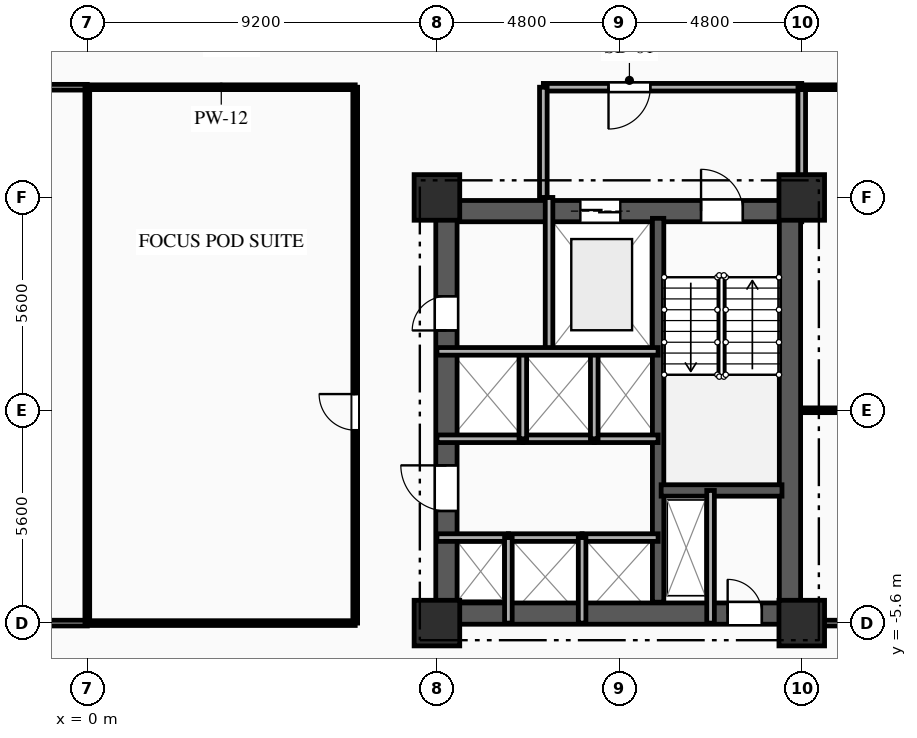
"""IFC4 building model, lengths in metres.
Left out: names, types, materials, properties, quantities, classifications, styles, units other than length and angle.
Written with IfcOpenShell. Run it as: python <this file> out.ifc"""

import sys

from ifc_helpers import new_model, si_unit, direction, frame, frame_2d, origin, origin_2d, place, context, subcontext, project, spatial, rectangle, extrude, element, fill, save


model = new_model("IFC4")
c1 = context("Model", 3, precision=1e-05, world=origin(), true_north=direction((0.0, 1.0)))
c2 = subcontext(c1, "Body", "Model", "MODEL_VIEW")
j1 = project(units=[si_unit("LENGTHUNIT", "METRE"), si_unit("PLANEANGLEUNIT", "RADIAN")], contexts=[c1])
p1 = place(None, origin())
s1 = spatial("IfcSite", under=j1, at=p1, CompositionType="ELEMENT")
p2 = place(p1, origin())
s2 = spatial("IfcBuilding", under=s1, at=p2, CompositionType="ELEMENT")
p3 = place(p2, frame((0.0, 0.0, 63.85)))
s3 = spatial("IfcBuildingStorey", under=s2, at=p3, CompositionType="ELEMENT", Elevation=63.85)
for number, where, z_axis, x_axis in (
    (1, (9.2, -5.6, 0.0), (0.0, 0.0, 1.0), (1.0, 0.0, 0.0)),
    (2, (9.2, 5.6, 0.0), (0.0, 0.0, 1.0), (1.0, 0.0, 0.0)),
    (3, (18.8, -5.6, 0.0), (0.0, 0.0, 1.0), (1.0, 0.0, 0.0)),
    (4, (18.8, 5.6, 0.0), (0.0, 0.0, 1.0), (1.0, 0.0, 0.0)),
):
    element("IfcColumn", number, at=place(p3, frame(where, z_axis=z_axis, x_axis=x_axis)), inside=s3, PredefinedType="COLUMN", context=c2, shape_type="SweptSolid", body=[
        extrude(rectangle(XDim=1.2, YDim=1.2, at=origin_2d()), origin(), (0.0, 0.0, 1.0), 3.35),
    ])
p4 = place(p3, frame((9.2, 5.24, 0.0), z_axis=(0.0, 0.0, 1.0), x_axis=(1.0, 0.0, 0.0)))
e5 = element("IfcWall", 5, at=p4, inside=s3, PredefinedType="SHEAR", context=c2, shape_type="SweptSolid", body=[
    extrude(rectangle(XDim=9.6, YDim=0.56, at=frame_2d((4.8, 0.0))), origin(), (0.0, 0.0, 1.0), 3.035),
])
p5 = place(p4, frame((6.95, 0.0, 0.0)))
e6 = element("IfcOpeningElement", 6, at=p5, cuts=e5, PredefinedType="OPENING", context=c2, shape_type="SweptSolid", body=[
    extrude(rectangle(XDim=1.1, YDim=2.15, at=frame_2d((0.55, 1.075))), frame((0.0, 0.29, 0.0), z_axis=(0.0, -1.0, 0.0), x_axis=(1.0, 0.0, 0.0)), (0.0, 0.0, 1.0), 0.58),
])
p6 = place(p4, frame((3.775, 0.0, 0.0)))
e7 = element("IfcOpeningElement", 7, at=p6, cuts=e5, PredefinedType="OPENING", context=c2, shape_type="SweptSolid", body=[
    extrude(rectangle(XDim=1.05, YDim=2.1, at=frame_2d((0.525, 1.05))), frame((0.0, 0.29, 0.0), z_axis=(0.0, -1.0, 0.0), x_axis=(1.0, 0.0, 0.0)), (0.0, 0.0, 1.0), 0.58),
])
p7 = place(p3, frame((9.2, -5.35, 0.0), z_axis=(0.0, 0.0, 1.0), x_axis=(1.0, 0.0, 0.0)))
e8 = element("IfcWall", 8, at=p7, inside=s3, PredefinedType="SHEAR", context=c2, shape_type="SweptSolid", body=[
    extrude(rectangle(XDim=9.6, YDim=0.56, at=frame_2d((4.8, 0.0))), origin(), (0.0, 0.0, 1.0), 3.035),
])
p8 = place(p7, frame((7.65, 0.0, 0.0)))
e9 = element("IfcOpeningElement", 9, at=p8, cuts=e8, PredefinedType="OPENING", context=c2, shape_type="SweptSolid", body=[
    extrude(rectangle(XDim=0.9, YDim=2.1, at=frame_2d((0.45, 1.05))), frame((0.0, 0.29, 0.0), z_axis=(0.0, -1.0, 0.0), x_axis=(1.0, 0.0, 0.0)), (0.0, 0.0, 1.0), 0.58),
])
p9 = place(p3, frame((9.45, -5.05, 0.0), z_axis=(0.0, 0.0, 1.0), x_axis=(0.0, 1.0, 0.0)))
e10 = element("IfcWall", 10, at=p9, inside=s3, PredefinedType="SHEAR", context=c2, shape_type="SweptSolid", body=[
    extrude(rectangle(XDim=10.1, YDim=0.56, at=frame_2d((5.05, 0.0))), origin(), (0.0, 0.0, 1.0), 3.035),
])
p10 = place(p9, frame((7.15, 0.0, 0.0)))
e11 = element("IfcOpeningElement", 11, at=p10, cuts=e10, PredefinedType="OPENING", context=c2, shape_type="SweptSolid", body=[
    extrude(rectangle(XDim=0.9, YDim=2.1, at=frame_2d((0.45, 1.05))), frame((0.0, 0.29, 0.0), z_axis=(0.0, -1.0, 0.0), x_axis=(1.0, 0.0, 0.0)), (0.0, 0.0, 1.0), 0.58),
])
p11 = place(p9, frame((2.4, 0.0, 0.0)))
e12 = element("IfcOpeningElement", 12, at=p11, cuts=e10, PredefinedType="OPENING", context=c2, shape_type="SweptSolid", body=[
    extrude(rectangle(XDim=1.2, YDim=2.15, at=frame_2d((0.6, 1.075))), frame((0.0, 0.29, 0.0), z_axis=(0.0, -1.0, 0.0), x_axis=(1.0, 0.0, 0.0)), (0.0, 0.0, 1.0), 0.58),
])
p12 = place(p3, frame((18.49, -5.05, 0.0), z_axis=(0.0, 0.0, 1.0), x_axis=(0.0, 1.0, 0.0)))
e13 = element("IfcWall", 13, at=p12, inside=s3, PredefinedType="SHEAR", context=c2, shape_type="SweptSolid", body=[
    extrude(rectangle(XDim=10.1, YDim=0.56, at=frame_2d((5.05, 0.0))), origin(), (0.0, 0.0, 1.0), 3.035),
])
p13 = place(p3, frame((15.02, -5.05, 0.0), z_axis=(0.0, 0.0, 1.0), x_axis=(0.0, 1.0, 0.0)))
e14 = element("IfcWall", 14, at=p13, inside=s3, PredefinedType="SHEAR", context=c2, shape_type="SweptSolid", body=[
    extrude(rectangle(XDim=10.1, YDim=0.3, at=frame_2d((5.05, 0.0))), origin(), (0.0, 0.0, 1.0), 3.035),
])
p14 = place(p3, frame((15.1, -2.11, 0.0), z_axis=(0.0, 0.0, 1.0), x_axis=(1.0, 0.0, 0.0)))
e15 = element("IfcWall", 15, at=p14, inside=s3, PredefinedType="SHEAR", context=c2, shape_type="SweptSolid", body=[
    extrude(rectangle(XDim=3.18, YDim=0.3, at=frame_2d((1.59, 0.0))), origin(), (0.0, 0.0, 1.0), 3.035),
])
p15 = place(p3, frame((16.4, -2.11, 0.0), z_axis=(0.0, 0.0, 1.0), x_axis=(0.0, -1.0, 0.0)))
e16 = element("IfcWall", 16, at=p15, inside=s3, PredefinedType="PARTITIONING", context=c2, shape_type="SweptSolid", body=[
    extrude(rectangle(XDim=3.49, YDim=0.2, at=frame_2d((1.745, 0.0))), origin(), (0.0, 0.0, 1.0), 3.035),
])
p16 = place(p3, frame((12.15, 5.6, 0.0), z_axis=(0.0, 0.0, 1.0), x_axis=(0.0, -1.0, 0.0)))
e17 = element("IfcWall", 17, at=p16, inside=s3, PredefinedType="PARTITIONING", context=c2, shape_type="SweptSolid", body=[
    extrude(rectangle(XDim=4.05, YDim=0.2, at=frame_2d((2.025, 0.0))), origin(), (0.0, 0.0, 1.0), 3.035),
])
p17 = place(p3, frame((18.8, 8.5, 0.0), z_axis=(0.0, 0.0, 1.0), x_axis=(-1.0, 0.0, 0.0)))
e18 = element("IfcWall", 18, at=p17, inside=s3, PredefinedType="PARTITIONING", context=c2, shape_type="SweptSolid", body=[
    extrude(rectangle(XDim=6.8, YDim=0.2, at=frame_2d((3.4, 0.0))), origin(), (0.0, 0.0, 1.0), 3.035),
])
p18 = place(p17, frame((3.985, 0.0, 0.0)))
e19 = element("IfcOpeningElement", 19, at=p18, cuts=e18, PredefinedType="OPENING", context=c2, shape_type="SweptSolid", body=[
    extrude(rectangle(XDim=1.1, YDim=2.15, at=frame_2d((0.55, 1.075))), frame((0.0, 0.11, 0.0), z_axis=(0.0, -1.0, 0.0), x_axis=(1.0, 0.0, 0.0)), (0.0, 0.0, 1.0), 0.22),
])
p19 = place(p3, frame((12.0, 8.5, 0.0), z_axis=(0.0, 0.0, 1.0), x_axis=(0.0, -1.0, 0.0)))
e20 = element("IfcWall", 20, at=p19, inside=s3, PredefinedType="PARTITIONING", context=c2, shape_type="SweptSolid", body=[
    extrude(rectangle(XDim=2.9, YDim=0.2, at=frame_2d((1.45, 0.0))), origin(), (0.0, 0.0, 1.0), 3.035),
])
p20 = place(p3, frame((18.8, 5.6, 0.0), z_axis=(0.0, 0.0, 1.0), x_axis=(0.0, 1.0, 0.0)))
e21 = element("IfcWall", 21, at=p20, inside=s3, PredefinedType="PARTITIONING", context=c2, shape_type="SweptSolid", body=[
    extrude(rectangle(XDim=2.9, YDim=0.2, at=frame_2d((1.45, 0.0))), origin(), (0.0, 0.0, 1.0), 2.52),
])
p21 = place(p3, frame((9.2, -3.35, 0.0), z_axis=(0.0, 0.0, 1.0), x_axis=(1.0, 0.0, 0.0)))
e22 = element("IfcWall", 22, at=p21, inside=s3, PredefinedType="PARTITIONING", context=c2, shape_type="SweptSolid", body=[
    extrude(rectangle(XDim=1.88, YDim=0.2, at=frame_2d((0.94, 0.0))), origin(), (0.0, 0.0, 1.0), 2.75),
])
p22 = place(p3, frame((11.08, -3.35, 0.0), z_axis=(0.0, 0.0, 1.0), x_axis=(1.0, 0.0, 0.0)))
e23 = element("IfcWall", 23, at=p22, inside=s3, PredefinedType="PARTITIONING", context=c2, shape_type="SweptSolid", body=[
    extrude(rectangle(XDim=1.94, YDim=0.2, at=frame_2d((0.97, 0.0))), origin(), (0.0, 0.0, 1.0), 3.035),
])
p23 = place(p3, frame((13.02, -3.35, 0.0), z_axis=(0.0, 0.0, 1.0), x_axis=(1.0, 0.0, 0.0)))
e24 = element("IfcWall", 24, at=p23, inside=s3, PredefinedType="PARTITIONING", context=c2, shape_type="SweptSolid", body=[
    extrude(rectangle(XDim=2.0, YDim=0.2, at=frame_2d((1.0, 0.0))), origin(), (0.0, 0.0, 1.0), 3.035),
])
p24 = place(p3, frame((11.46, -0.75, 0.0), z_axis=(0.0, 0.0, 1.0), x_axis=(-1.0, 0.0, 0.0)))
e25 = element("IfcWall", 25, at=p24, inside=s3, PredefinedType="PARTITIONING", context=c2, shape_type="SweptSolid", body=[
    extrude(rectangle(XDim=2.26, YDim=0.2, at=frame_2d((1.13, 0.0))), origin(), (0.0, 0.0, 1.0), 3.035),
])
p25 = place(p3, frame((13.34, -0.75, 0.0), z_axis=(0.0, 0.0, 1.0), x_axis=(-1.0, 0.0, 0.0)))
e26 = element("IfcWall", 26, at=p25, inside=s3, PredefinedType="PARTITIONING", context=c2, shape_type="SweptSolid", body=[
    extrude(rectangle(XDim=1.88, YDim=0.2, at=frame_2d((0.94, 0.0))), origin(), (0.0, 0.0, 1.0), 3.035),
])
p26 = place(p3, frame((15.02, -0.75, 0.0), z_axis=(0.0, 0.0, 1.0), x_axis=(-1.0, 0.0, 0.0)))
e27 = element("IfcWall", 27, at=p26, inside=s3, PredefinedType="PARTITIONING", context=c2, shape_type="SweptSolid", body=[
    extrude(rectangle(XDim=1.68, YDim=0.2, at=frame_2d((0.84, 0.0))), origin(), (0.0, 0.0, 1.0), 3.035),
])
for number, where, z_axis, x_axis in (
    (28, (11.08, -5.6, 0.0), (0.0, 0.0, 1.0), (0.0, 1.0, 0.0)),
    (29, (13.02, -5.6, 0.0), (0.0, 0.0, 1.0), (0.0, 1.0, 0.0)),
):
    element("IfcWall", number, at=place(p3, frame(where, z_axis=z_axis, x_axis=x_axis)), inside=s3, PredefinedType="PARTITIONING", context=c2, shape_type="SweptSolid", body=[
        extrude(rectangle(XDim=2.25, YDim=0.2, at=frame_2d((1.125, 0.0))), origin(), (0.0, 0.0, 1.0), 3.035),
    ])
for number, where, z_axis, x_axis in (
    (30, (11.46, -0.75, 0.0), (0.0, 0.0, 1.0), (0.0, 1.0, 0.0)),
    (31, (13.34, -0.75, 0.0), (0.0, 0.0, 1.0), (0.0, 1.0, 0.0)),
):
    element("IfcWall", number, at=place(p3, frame(where, z_axis=z_axis, x_axis=x_axis)), inside=s3, PredefinedType="PARTITIONING", context=c2, shape_type="SweptSolid", body=[
        extrude(rectangle(XDim=2.3, YDim=0.2, at=frame_2d((1.15, 0.0))), origin(), (0.0, 0.0, 1.0), 3.035),
    ])
p27 = place(p3, frame((0.0, 8.5, 0.0), z_axis=(0.0, 0.0, 1.0), x_axis=(-1.0, 0.0, 0.0)))
e32 = element("IfcWall", 32, at=p27, inside=s3, PredefinedType="PARTITIONING", context=c2, shape_type="SweptSolid", body=[
    extrude(rectangle(XDim=7.05, YDim=0.15, at=frame_2d((3.525, 0.0))), origin(), (0.0, 0.0, 1.0), 3.035),
])
p28 = place(p3, frame((23.0, 8.5, 0.0), z_axis=(0.0, 0.0, 1.0), x_axis=(-1.0, 0.0, 0.0)))
e33 = element("IfcWall", 33, at=p28, inside=s3, PredefinedType="PARTITIONING", context=c2, shape_type="SweptSolid", body=[
    extrude(rectangle(XDim=4.2, YDim=0.125, at=frame_2d((2.1, 0.0))), origin(), (0.0, 0.0, 1.0), 3.035),
])
p29 = place(p28, frame((0.841, 0.0, 0.0)))
e34 = element("IfcOpeningElement", 34, at=p29, cuts=e33, PredefinedType="OPENING", context=c2, shape_type="SweptSolid", body=[
    extrude(rectangle(XDim=0.95, YDim=2.1, at=frame_2d((0.475, 1.05))), frame((0.0, 0.073, 0.0), z_axis=(0.0, -1.0, 0.0), x_axis=(1.0, 0.0, 0.0)), (0.0, 0.0, 1.0), 0.145),
])
p30 = place(p3, frame((7.05, 8.5, 0.0), z_axis=(0.0, 0.0, 1.0), x_axis=(-1.0, 0.0, 0.0)))
e35 = element("IfcWall", 35, at=p30, inside=s3, PredefinedType="PARTITIONING", context=c2, shape_type="SweptSolid", body=[
    extrude(rectangle(XDim=7.05, YDim=0.125, at=frame_2d((3.525, 0.0))), origin(), (0.0, 0.0, 1.0), 3.035),
])
p31 = place(p3, frame((-7.05, -5.6, 0.0), z_axis=(0.0, 0.0, 1.0), x_axis=(1.0, 0.0, 0.0)))
e36 = element("IfcWall", 36, at=p31, inside=s3, PredefinedType="PARTITIONING", context=c2, shape_type="SweptSolid", body=[
    extrude(rectangle(XDim=7.05, YDim=0.15, at=frame_2d((3.525, 0.0))), origin(), (0.0, 0.0, 1.0), 2.52),
])
p32 = place(p3, frame((18.8, -5.6, 0.0), z_axis=(0.0, 0.0, 1.0), x_axis=(1.0, 0.0, 0.0)))
e37 = element("IfcWall", 37, at=p32, inside=s3, PredefinedType="PARTITIONING", context=c2, shape_type="SweptSolid", body=[
    extrude(rectangle(XDim=4.2, YDim=0.15, at=frame_2d((2.1, 0.0))), origin(), (0.0, 0.0, 1.0), 3.035),
])
p33 = place(p32, frame((2.321, 0.0, 0.0)))
e38 = element("IfcOpeningElement", 38, at=p33, cuts=e37, PredefinedType="OPENING", context=c2, shape_type="SweptSolid", body=[
    extrude(rectangle(XDim=1.05, YDim=2.15, at=frame_2d((0.525, 1.075))), frame((0.0, 0.085, 0.0), z_axis=(0.0, -1.0, 0.0), x_axis=(1.0, 0.0, 0.0)), (0.0, 0.0, 1.0), 0.17),
])
p34 = place(p3, frame((0.0, -5.6, 0.0), z_axis=(0.0, 0.0, 1.0), x_axis=(1.0, 0.0, 0.0)))
e39 = element("IfcWall", 39, at=p34, inside=s3, PredefinedType="PARTITIONING", context=c2, shape_type="SweptSolid", body=[
    extrude(rectangle(XDim=7.05, YDim=0.125, at=frame_2d((3.525, 0.0))), origin(), (0.0, 0.0, 1.0), 2.52),
])
p35 = place(p3, frame((7.05, -5.6, 0.0), z_axis=(0.0, 0.0, 1.0), x_axis=(0.0, 1.0, 0.0)))
e40 = element("IfcWall", 40, at=p35, inside=s3, PredefinedType="PARTITIONING", context=c2, shape_type="SweptSolid", body=[
    extrude(rectangle(XDim=14.1, YDim=0.125, at=frame_2d((7.05, 0.0))), origin(), (0.0, 0.0, 1.0), 3.035),
])
p36 = place(p35, frame((5.076, 0.0, 0.0)))
e41 = element("IfcOpeningElement", 41, at=p36, cuts=e40, PredefinedType="OPENING", context=c2, shape_type="SweptSolid", body=[
    extrude(rectangle(XDim=0.95, YDim=2.1, at=frame_2d((0.475, 1.05))), frame((0.0, 0.073, 0.0), z_axis=(0.0, -1.0, 0.0), x_axis=(1.0, 0.0, 0.0)), (0.0, 0.0, 1.0), 0.145),
])
p37 = place(p3, frame((18.8, 0.0, 0.0), z_axis=(0.0, 0.0, 1.0), x_axis=(1.0, 0.0, 0.0)))
e42 = element("IfcWall", 42, at=p37, inside=s3, PredefinedType="PARTITIONING", context=c2, shape_type="SweptSolid", body=[
    extrude(rectangle(XDim=14.0, YDim=0.125, at=frame_2d((7.0, 0.0))), origin(), (0.0, 0.0, 1.0), 3.035),
])
p38 = place(p3, frame((0.0, 8.5, 0.0), z_axis=(0.0, 0.0, 1.0), x_axis=(0.0, -1.0, 0.0)))
e43 = element("IfcWall", 43, at=p38, inside=s3, PredefinedType="PARTITIONING", context=c2, shape_type="SweptSolid", body=[
    extrude(rectangle(XDim=14.1, YDim=0.125, at=frame_2d((7.05, 0.0))), origin(), (0.0, 0.0, 1.0), 3.035),
])
p39 = place(p3, frame((9.2, 1.55, 0.0), z_axis=(0.0, 0.0, 1.0), x_axis=(1.0, 0.0, 0.0)))
e44 = element("IfcWall", 44, at=p39, inside=s3, PredefinedType="PARTITIONING", context=c2, shape_type="SweptSolid", body=[
    extrude(rectangle(XDim=5.82, YDim=0.2, at=frame_2d((2.91, 0.0))), origin(), (0.0, 0.0, 1.0), 3.035),
])
p40 = place(p5, origin())
e45 = element("IfcDoor", 45, at=p40, inside=s3, OperationType="SINGLE_SWING_LEFT", PredefinedType="DOOR", context=c2, shape_type="SweptSolid", body=[
    extrude(rectangle(XDim=1.1, YDim=2.15, at=frame_2d((0.55, 1.075))), frame((0.0, 0.025, 0.0), z_axis=(0.0, -1.0, 0.0), x_axis=(1.0, 0.0, 0.0)), (0.0, 0.0, 1.0), 0.05),
])
fill(e6, e45)
p41 = place(p6, origin())
e46 = element("IfcDoor", 46, at=p41, inside=s3, OperationType="DOUBLE_DOOR_SLIDING", PredefinedType="DOOR", context=c2, shape_type="SweptSolid", body=[
    extrude(rectangle(XDim=1.05, YDim=2.1, at=frame_2d((0.525, 1.05))), frame((0.0, 0.025, 0.0), z_axis=(0.0, -1.0, 0.0), x_axis=(1.0, 0.0, 0.0)), (0.0, 0.0, 1.0), 0.05),
])
fill(e7, e46)
p42 = place(p8, origin())
e47 = element("IfcDoor", 47, at=p42, inside=s3, OperationType="SINGLE_SWING_LEFT", PredefinedType="DOOR", context=c2, shape_type="SweptSolid", body=[
    extrude(rectangle(XDim=0.9, YDim=2.1, at=frame_2d((0.45, 1.05))), frame((0.0, 0.025, 0.0), z_axis=(0.0, -1.0, 0.0), x_axis=(1.0, 0.0, 0.0)), (0.0, 0.0, 1.0), 0.05),
])
fill(e9, e47)
p43 = place(p18, origin())
e48 = element("IfcDoor", 48, at=p43, inside=s3, OperationType="SINGLE_SWING_RIGHT", PredefinedType="DOOR", context=c2, shape_type="SweptSolid", body=[
    extrude(rectangle(XDim=1.1, YDim=2.15, at=frame_2d((0.55, 1.075))), frame((0.0, 0.025, 0.0), z_axis=(0.0, -1.0, 0.0), x_axis=(1.0, 0.0, 0.0)), (0.0, 0.0, 1.0), 0.05),
])
fill(e19, e48)
p44 = place(p10, origin())
e49 = element("IfcDoor", 49, at=p44, inside=s3, OperationType="SINGLE_SWING_LEFT", PredefinedType="DOOR", context=c2, shape_type="SweptSolid", body=[
    extrude(rectangle(XDim=0.9, YDim=2.1, at=frame_2d((0.45, 1.05))), frame((0.0, 0.025, 0.0), z_axis=(0.0, -1.0, 0.0), x_axis=(1.0, 0.0, 0.0)), (0.0, 0.0, 1.0), 0.05),
])
fill(e11, e49)
p45 = place(p11, origin())
e50 = element("IfcDoor", 50, at=p45, inside=s3, OperationType="SINGLE_SWING_RIGHT", PredefinedType="DOOR", context=c2, shape_type="SweptSolid", body=[
    extrude(rectangle(XDim=1.2, YDim=2.15, at=frame_2d((0.6, 1.075))), frame((0.0, 0.025, 0.0), z_axis=(0.0, -1.0, 0.0), x_axis=(1.0, 0.0, 0.0)), (0.0, 0.0, 1.0), 0.05),
])
fill(e12, e50)
p46 = place(p36, origin())
e51 = element("IfcDoor", 51, at=p46, inside=s3, OperationType="SINGLE_SWING_RIGHT", PredefinedType="DOOR", context=c2, shape_type="SweptSolid", body=[
    extrude(rectangle(XDim=0.95, YDim=2.1, at=frame_2d((0.475, 1.05))), frame((0.0, 0.025, 0.0), z_axis=(0.0, -1.0, 0.0), x_axis=(1.0, 0.0, 0.0)), (0.0, 0.0, 1.0), 0.05),
])
fill(e41, e51)
save(model, sys.argv[1])
